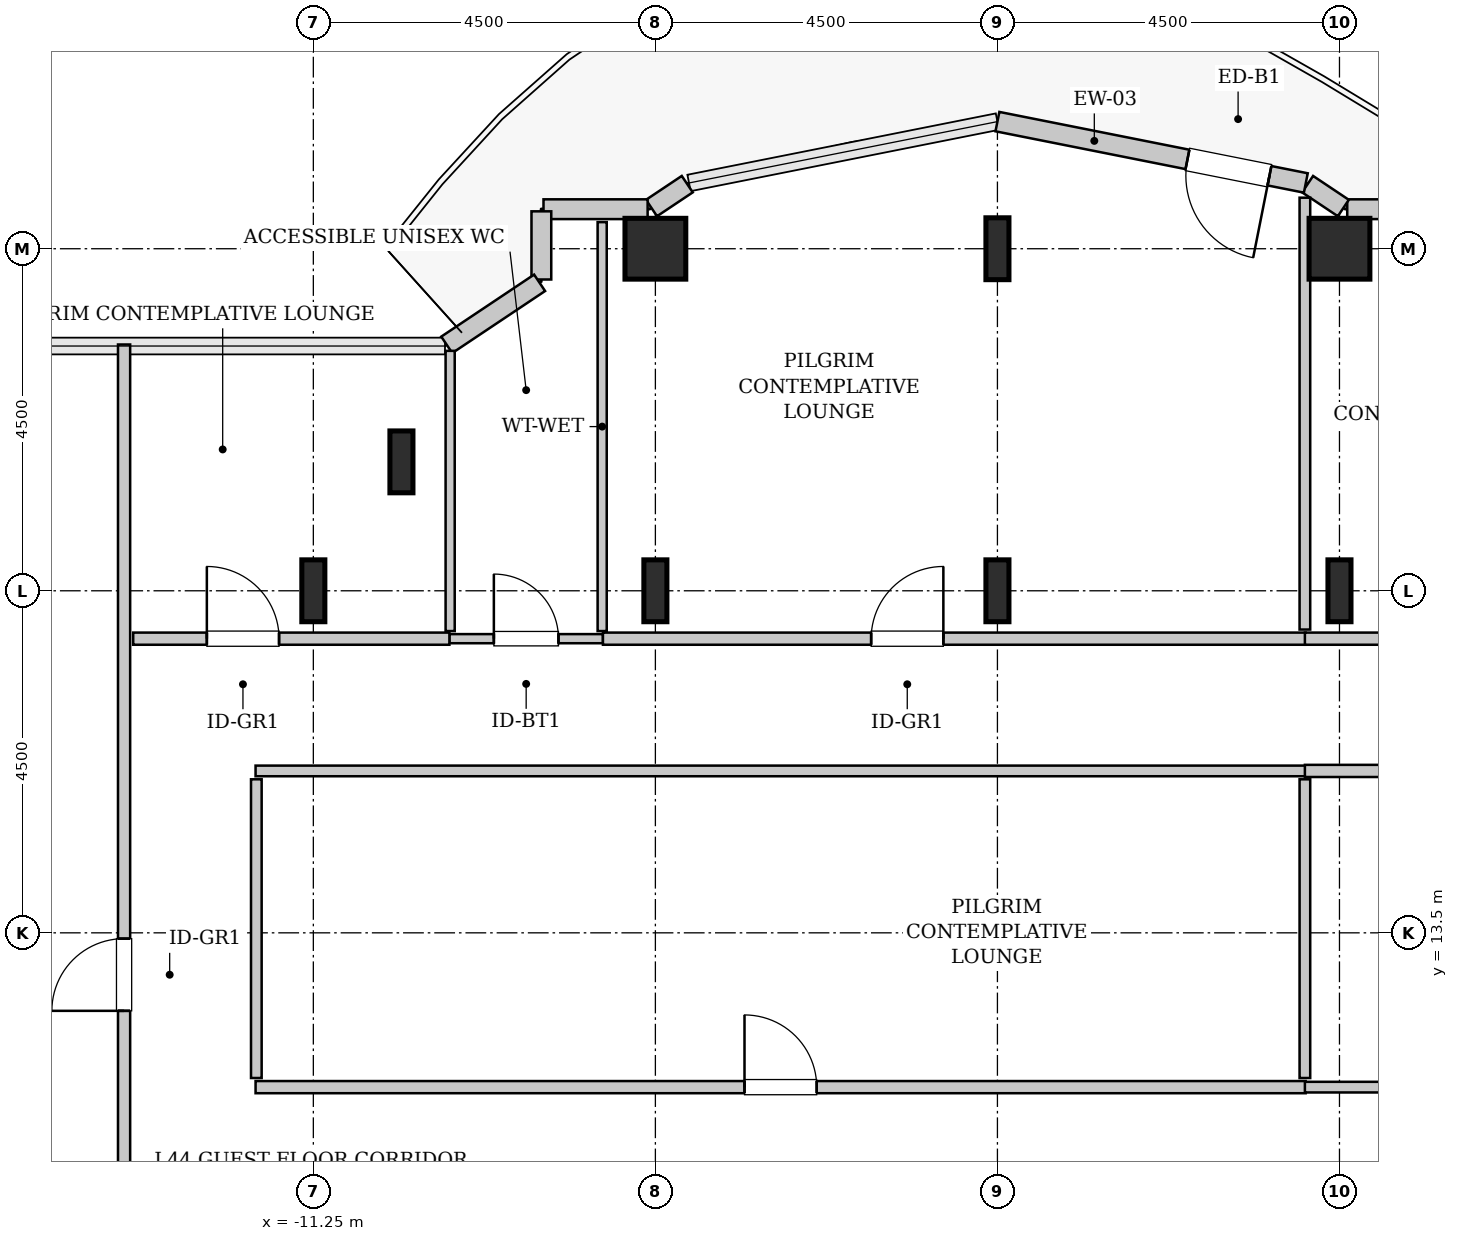
"""IFC4 building model, lengths in metres.
Left out: names, types, materials, properties, quantities, classifications, styles, units other than length and angle.
Written with IfcOpenShell. Run it as: python <this file> out.ifc"""

import sys

from ifc_helpers import new_model, si_unit, direction, frame, frame_2d, origin, origin_2d, place, context, subcontext, project, spatial, rectangle, hollow_rectangle, i_section, extrude, source, transform, mapped, element, fill, save


model = new_model("IFC4")
c1 = context("Model", 3, precision=1e-05, world=origin(), true_north=direction((0.0, 1.0)))
c2 = subcontext(c1, "Body", "Model", "MODEL_VIEW")
j1 = project(units=[si_unit("LENGTHUNIT", "METRE"), si_unit("PLANEANGLEUNIT", "RADIAN")], contexts=[c1])
p1 = place(None, origin())
s1 = spatial("IfcSite", under=j1, at=p1, CompositionType="ELEMENT")
p2 = place(p1, origin())
s2 = spatial("IfcBuilding", under=s1, at=p2, CompositionType="ELEMENT")
p3 = place(p2, frame((0.0, 0.0, 179.2)))
s3 = spatial("IfcBuildingStorey", under=s2, at=p3, CompositionType="ELEMENT", Elevation=179.2)
m1 = source(origin(), c2, "Body", "SweptSolid", [
    extrude(i_section(OverallWidth=0.303, OverallDepth=0.814, WebThickness=0.021, FlangeThickness=0.04, FilletRadius=0.03, at=origin_2d()), origin(), (0.0, 0.0, 1.0), 3.8),
])
for number, where, z_axis, x_axis in (
    (1, (-11.25, 18.0, 0.0), (0.0, 0.0, 1.0), (1.0, 0.0, 0.0)),
    (2, (-10.091, 19.696, 0.0), (0.0, 0.0, 1.0), (1.0, 0.0, 0.0)),
    (3, (-6.75, 18.0, 0.0), (0.0, 0.0, 1.0), (1.0, 0.0, 0.0)),
):
    element("IfcColumn", number, at=place(p3, frame(where, z_axis=z_axis, x_axis=x_axis)), inside=s3, PredefinedType="COLUMN", context=c2, shape_type="MappedRepresentation", body=[
        mapped(m1, transform((0.0, 0.0, 0.0), x_axis=(1.0, 0.0, 0.0), y_axis=(0.0, 1.0, 0.0), z_axis=(0.0, 0.0, 1.0), scale=1.0)),
    ])
m2 = source(origin(), c2, "Body", "SweptSolid", [
    extrude(hollow_rectangle(XDim=0.8, YDim=0.8, WallThickness=0.04, InnerFilletRadius=0.04, OuterFilletRadius=0.08, at=origin_2d()), origin(), (0.0, 0.0, 1.0), 3.8),
])
p4 = place(p3, frame((-6.75, 22.5, 0.0), z_axis=(0.0, 0.0, 1.0), x_axis=(1.0, 0.0, 0.0)))
e4 = element("IfcColumn", 4, at=p4, inside=s3, PredefinedType="COLUMN", context=c2, shape_type="MappedRepresentation", body=[
    mapped(m2, transform((0.0, 0.0, 0.0), x_axis=(1.0, 0.0, 0.0), y_axis=(0.0, 1.0, 0.0), z_axis=(0.0, 0.0, 1.0), scale=1.0)),
])
for number, where, z_axis, x_axis in (
    (5, (-2.25, 18.0, 0.0), (0.0, 0.0, 1.0), (1.0, 0.0, 0.0)),
    (6, (-2.25, 22.5, 0.0), (0.0, 0.0, 1.0), (1.0, 0.0, 0.0)),
    (7, (2.25, 18.0, 0.0), (0.0, 0.0, 1.0), (1.0, 0.0, 0.0)),
):
    element("IfcColumn", number, at=place(p3, frame(where, z_axis=z_axis, x_axis=x_axis)), inside=s3, PredefinedType="COLUMN", context=c2, shape_type="MappedRepresentation", body=[
        mapped(m1, transform((0.0, 0.0, 0.0), x_axis=(1.0, 0.0, 0.0), y_axis=(0.0, 1.0, 0.0), z_axis=(0.0, 0.0, 1.0), scale=1.0)),
    ])
p5 = place(p3, frame((2.25, 22.5, 0.0), z_axis=(0.0, 0.0, 1.0), x_axis=(1.0, 0.0, 0.0)))
e8 = element("IfcColumn", 8, at=p5, inside=s3, PredefinedType="COLUMN", context=c2, shape_type="MappedRepresentation", body=[
    mapped(m2, transform((0.0, 0.0, 0.0), x_axis=(1.0, 0.0, 0.0), y_axis=(0.0, 1.0, 0.0), z_axis=(0.0, 0.0, 1.0), scale=1.0)),
])
m3 = source(origin(), c2, "Body", "SweptSolid", [
    extrude(rectangle(XDim=1.37, YDim=0.26, at=frame_2d((0.685, 0.0))), origin(), (0.0, 0.0, 1.0), 3.55),
])
p6 = place(p3, frame((3.722, 23.02, 0.0), z_axis=(0.0, 0.0, 1.0), x_axis=(-1.0, 0.0, 0.0)))
e9 = element("IfcWall", 9, at=p6, inside=s3, PredefinedType="SOLIDWALL", context=c2, shape_type="MappedRepresentation", body=[
    mapped(m3, transform((0.0, 0.0, 0.0), x_axis=(1.0, 0.0, 0.0), y_axis=(0.0, 1.0, 0.0), z_axis=(0.0, 0.0, 1.0), scale=1.0)),
])
m4 = source(origin(), c2, "Body", "SweptSolid", [
    extrude(rectangle(XDim=0.565, YDim=0.26, at=frame_2d((0.283, 0.0))), origin(), (0.0, 0.0, 1.0), 3.55),
])
p7 = place(p3, frame((2.301, 23.036, 0.0), z_axis=(0.0, 0.0, 1.0), x_axis=(-0.831651492666, 0.555297933317, 0.0)))
e10 = element("IfcWall", 10, at=p7, inside=s3, PredefinedType="SOLIDWALL", context=c2, shape_type="MappedRepresentation", body=[
    mapped(m4, transform((0.0, 0.0, 0.0), x_axis=(1.0, 0.0, 0.0), y_axis=(0.0, 1.0, 0.0), z_axis=(0.0, 0.0, 1.0), scale=1.0)),
])
m5 = source(origin(), c2, "Body", "SweptSolid", [
    extrude(rectangle(XDim=4.137, YDim=0.26, at=frame_2d((2.068, 0.0))), origin(), (0.0, 0.0, 1.0), 3.55),
])
p8 = place(p3, frame((1.807, 23.365, 0.0), z_axis=(0.0, 0.0, 1.0), x_axis=(-0.980782170794, 0.195105954428, 0.0)))
e11 = element("IfcWall", 11, at=p8, inside=s3, PredefinedType="SOLIDWALL", context=c2, shape_type="MappedRepresentation", body=[
    mapped(m5, transform((0.0, 0.0, 0.0), x_axis=(1.0, 0.0, 0.0), y_axis=(0.0, 1.0, 0.0), z_axis=(0.0, 0.0, 1.0), scale=1.0)),
])
p9 = place(p8, frame((0.488, 0.0, 0.0)))
e12 = element("IfcOpeningElement", 12, at=p9, cuts=e11, PredefinedType="OPENING", context=c2, shape_type="SweptSolid", body=[
    extrude(rectangle(XDim=1.1, YDim=2.2, at=frame_2d((0.55, 1.1))), frame((0.0, 0.14, 0.0), z_axis=(0.0, -1.0, 0.0), x_axis=(1.0, 0.0, 0.0)), (0.0, 0.0, 1.0), 0.28),
])
p10 = place(p3, frame((-6.331, 23.35, 0.0), z_axis=(0.0, 0.0, 1.0), x_axis=(-0.831651492666, -0.555297933317, 0.0)))
e13 = element("IfcWall", 13, at=p10, inside=s3, PredefinedType="SOLIDWALL", context=c2, shape_type="MappedRepresentation", body=[
    mapped(m4, transform((0.0, 0.0, 0.0), x_axis=(1.0, 0.0, 0.0), y_axis=(0.0, 1.0, 0.0), z_axis=(0.0, 0.0, 1.0), scale=1.0)),
])
p11 = place(p3, frame((-6.852, 23.02, 0.0), z_axis=(0.0, 0.0, 1.0), x_axis=(-1.0, 0.0, 0.0)))
e14 = element("IfcWall", 14, at=p11, inside=s3, PredefinedType="SOLIDWALL", context=c2, shape_type="MappedRepresentation", body=[
    mapped(m3, transform((0.0, 0.0, 0.0), x_axis=(1.0, 0.0, 0.0), y_axis=(0.0, 1.0, 0.0), z_axis=(0.0, 0.0, 1.0), scale=1.0)),
])
m6 = source(origin(), c2, "Body", "SweptSolid", [
    extrude(rectangle(XDim=0.897, YDim=0.26, at=frame_2d((0.448, 0.0))), origin(), (0.0, 0.0, 1.0), 3.55),
])
p12 = place(p3, frame((-8.25, 22.992, 0.0), z_axis=(0.0, 0.0, 1.0), x_axis=(0.0, -1.0, 0.0)))
e15 = element("IfcWall", 15, at=p12, inside=s3, PredefinedType="SOLIDWALL", context=c2, shape_type="MappedRepresentation", body=[
    mapped(m6, transform((0.0, 0.0, 0.0), x_axis=(1.0, 0.0, 0.0), y_axis=(0.0, 1.0, 0.0), z_axis=(0.0, 0.0, 1.0), scale=1.0)),
])
m7 = source(origin(), c2, "Body", "SweptSolid", [
    extrude(rectangle(XDim=1.469, YDim=0.26, at=frame_2d((0.734, 0.0))), origin(), (0.0, 0.0, 1.0), 3.55),
])
p13 = place(p3, frame((-8.273, 22.052, 0.0), z_axis=(0.0, 0.0, 1.0), x_axis=(-0.831461760506, -0.555581983884, 0.0)))
e16 = element("IfcWall", 16, at=p13, inside=s3, PredefinedType="SOLIDWALL", context=c2, shape_type="MappedRepresentation", body=[
    mapped(m7, transform((0.0, 0.0, 0.0), x_axis=(1.0, 0.0, 0.0), y_axis=(0.0, 1.0, 0.0), z_axis=(0.0, 0.0, 1.0), scale=1.0)),
])
m8 = source(origin(), c2, "Body", "SweptSolid", [
    extrude(rectangle(XDim=2.02, YDim=0.12, at=frame_2d((1.01, 0.0))), origin(), (0.0, 0.0, 1.0), 3.535),
])
p14 = place(p3, frame((-9.46, 17.37, 0.0), z_axis=(0.0, 0.0, 1.0), x_axis=(1.0, 0.0, 0.0)))
e17 = element("IfcWall", 17, at=p14, inside=s3, PredefinedType="PLUMBINGWALL", context=c2, shape_type="MappedRepresentation", body=[
    mapped(m8, transform((0.0, 0.0, 0.0), x_axis=(1.0, 0.0, 0.0), y_axis=(0.0, 1.0, 0.0), z_axis=(0.0, 0.0, 1.0), scale=1.0)),
])
p15 = place(p14, frame((0.585, 0.0, 0.0)))
e18 = element("IfcOpeningElement", 18, at=p15, cuts=e17, PredefinedType="OPENING", context=c2, shape_type="SweptSolid", body=[
    extrude(rectangle(XDim=0.85, YDim=2.1, at=frame_2d((0.425, 1.05))), frame((0.0, 0.07, 0.0), z_axis=(0.0, -1.0, 0.0), x_axis=(1.0, 0.0, 0.0)), (0.0, 0.0, 1.0), 0.14),
])
m9 = source(origin(), c2, "Body", "SweptSolid", [
    extrude(rectangle(XDim=5.38, YDim=0.12, at=frame_2d((2.69, 0.0))), origin(), (0.0, 0.0, 1.0), 3.535),
])
p16 = place(p3, frame((-7.45, 17.47, 0.0), z_axis=(0.0, 0.0, 1.0), x_axis=(0.0, 1.0, 0.0)))
e19 = element("IfcWall", 19, at=p16, inside=s3, PredefinedType="PLUMBINGWALL", context=c2, shape_type="MappedRepresentation", body=[
    mapped(m9, transform((0.0, 0.0, 0.0), x_axis=(1.0, 0.0, 0.0), y_axis=(0.0, 1.0, 0.0), z_axis=(0.0, 0.0, 1.0), scale=1.0)),
])
m10 = source(origin(), c2, "Body", "SweptSolid", [
    extrude(rectangle(XDim=3.687, YDim=0.12, at=frame_2d((1.843, 0.0))), origin(), (0.0, 0.0, 1.0), 3.535),
])
p17 = place(p3, frame((-9.45, 17.47, 0.0), z_axis=(0.0, 0.0, 1.0), x_axis=(0.0, 1.0, 0.0)))
e20 = element("IfcWall", 20, at=p17, inside=s3, PredefinedType="PLUMBINGWALL", context=c2, shape_type="MappedRepresentation", body=[
    mapped(m10, transform((0.0, 0.0, 0.0), x_axis=(1.0, 0.0, 0.0), y_axis=(0.0, 1.0, 0.0), z_axis=(0.0, 0.0, 1.0), scale=1.0)),
])
m11 = source(origin(), c2, "Body", "SweptSolid", [
    extrude(rectangle(XDim=12.752, YDim=0.16, at=frame_2d((6.376, 0.0))), origin(), (0.0, 0.0, 1.0), 3.535),
])
p18 = place(p3, frame((-13.74, 8.488, 0.0), z_axis=(0.0, 0.0, 1.0), x_axis=(0.0, 1.0, 0.0)))
e21 = element("IfcWall", 21, at=p18, inside=s3, PredefinedType="PARTITIONING", context=c2, shape_type="MappedRepresentation", body=[
    mapped(m11, transform((0.0, 0.0, 0.0), x_axis=(1.0, 0.0, 0.0), y_axis=(0.0, 1.0, 0.0), z_axis=(0.0, 0.0, 1.0), scale=1.0)),
])
p19 = place(p18, frame((3.986, 0.0, 0.0)))
e22 = element("IfcOpeningElement", 22, at=p19, cuts=e21, PredefinedType="OPENING", context=c2, shape_type="SweptSolid", body=[
    extrude(rectangle(XDim=0.95, YDim=2.1, at=frame_2d((0.475, 1.05))), frame((0.0, 0.09, 0.0), z_axis=(0.0, -1.0, 0.0), x_axis=(1.0, 0.0, 0.0)), (0.0, 0.0, 1.0), 0.18),
])
m12 = source(origin(), c2, "Body", "SweptSolid", [
    extrude(rectangle(XDim=13.815, YDim=0.16, at=frame_2d((6.907, 0.0))), origin(), (0.0, 0.0, 1.0), 3.535),
])
p20 = place(p3, frame((-12.01, 11.47, 0.0), z_axis=(0.0, 0.0, 1.0), x_axis=(1.0, 0.0, 0.0)))
e23 = element("IfcWall", 23, at=p20, inside=s3, PredefinedType="PARTITIONING", context=c2, shape_type="MappedRepresentation", body=[
    mapped(m12, transform((0.0, 0.0, 0.0), x_axis=(1.0, 0.0, 0.0), y_axis=(0.0, 1.0, 0.0), z_axis=(0.0, 0.0, 1.0), scale=1.0)),
])
p21 = place(p20, frame((6.433, 0.0, 0.0)))
e24 = element("IfcOpeningElement", 24, at=p21, cuts=e23, PredefinedType="OPENING", context=c2, shape_type="SweptSolid", body=[
    extrude(rectangle(XDim=0.95, YDim=2.1, at=frame_2d((0.475, 1.05))), frame((0.0, 0.09, 0.0), z_axis=(0.0, -1.0, 0.0), x_axis=(1.0, 0.0, 0.0)), (0.0, 0.0, 1.0), 0.18),
])
m13 = source(origin(), c2, "Body", "SweptSolid", [
    extrude(rectangle(XDim=13.815, YDim=0.14, at=frame_2d((6.907, 0.0))), origin(), (0.0, 0.0, 1.0), 3.535),
])
p22 = place(p3, frame((-12.01, 15.63, 0.0), z_axis=(0.0, 0.0, 1.0), x_axis=(1.0, 0.0, 0.0)))
e25 = element("IfcWall", 25, at=p22, inside=s3, PredefinedType="PARTITIONING", context=c2, shape_type="MappedRepresentation", body=[
    mapped(m13, transform((0.0, 0.0, 0.0), x_axis=(1.0, 0.0, 0.0), y_axis=(0.0, 1.0, 0.0), z_axis=(0.0, 0.0, 1.0), scale=1.0)),
])
m14 = source(origin(), c2, "Body", "SweptSolid", [
    extrude(rectangle(XDim=3.93, YDim=0.14, at=frame_2d((1.965, 0.0))), origin(), (0.0, 0.0, 1.0), 3.535),
])
for number, where, z_axis, x_axis in (
    (26, (-12.0, 11.59, 0.0), (0.0, 0.0, 1.0), (0.0, 1.0, 0.0)),
    (27, (1.795, 11.59, 0.0), (0.0, 0.0, 1.0), (0.0, 1.0, 0.0)),
):
    element("IfcWall", number, at=place(p3, frame(where, z_axis=z_axis, x_axis=x_axis)), inside=s3, PredefinedType="PARTITIONING", context=c2, shape_type="MappedRepresentation", body=[
        mapped(m14, transform((0.0, 0.0, 0.0), x_axis=(1.0, 0.0, 0.0), y_axis=(0.0, 1.0, 0.0), z_axis=(0.0, 0.0, 1.0), scale=1.0)),
    ])
m15 = source(origin(), c2, "Body", "SweptSolid", [
    extrude(rectangle(XDim=9.245, YDim=0.16, at=frame_2d((4.623, 0.0))), origin(), (0.0, 0.0, 1.0), 3.535),
])
p23 = place(p3, frame((-7.44, 17.37, 0.0), z_axis=(0.0, 0.0, 1.0), x_axis=(1.0, 0.0, 0.0)))
e28 = element("IfcWall", 28, at=p23, inside=s3, PredefinedType="PARTITIONING", context=c2, shape_type="MappedRepresentation", body=[
    mapped(m15, transform((0.0, 0.0, 0.0), x_axis=(1.0, 0.0, 0.0), y_axis=(0.0, 1.0, 0.0), z_axis=(0.0, 0.0, 1.0), scale=1.0)),
])
p24 = place(p23, frame((3.529, 0.0, 0.0)))
e29 = element("IfcOpeningElement", 29, at=p24, cuts=e28, PredefinedType="OPENING", context=c2, shape_type="SweptSolid", body=[
    extrude(rectangle(XDim=0.95, YDim=2.1, at=frame_2d((0.475, 1.05))), frame((0.0, 0.09, 0.0), z_axis=(0.0, -1.0, 0.0), x_axis=(1.0, 0.0, 0.0)), (0.0, 0.0, 1.0), 0.18),
])
m16 = source(origin(), c2, "Body", "SweptSolid", [
    extrude(rectangle(XDim=5.681, YDim=0.14, at=frame_2d((2.841, 0.0))), origin(), (0.0, 0.0, 1.0), 2.875),
])
p25 = place(p3, frame((1.795, 17.49, 0.0), z_axis=(0.0, 0.0, 1.0), x_axis=(0.0, 1.0, 0.0)))
e30 = element("IfcWall", 30, at=p25, inside=s3, PredefinedType="PARTITIONING", context=c2, shape_type="MappedRepresentation", body=[
    mapped(m16, transform((0.0, 0.0, 0.0), x_axis=(1.0, 0.0, 0.0), y_axis=(0.0, 1.0, 0.0), z_axis=(0.0, 0.0, 1.0), scale=1.0)),
])
m17 = source(origin(), c2, "Body", "SweptSolid", [
    extrude(rectangle(XDim=4.16, YDim=0.16, at=frame_2d((2.08, 0.0))), origin(), (0.0, 0.0, 1.0), 3.535),
])
p26 = place(p3, frame((-13.62, 17.37, 0.0), z_axis=(0.0, 0.0, 1.0), x_axis=(1.0, 0.0, 0.0)))
e31 = element("IfcWall", 31, at=p26, inside=s3, PredefinedType="PARTITIONING", context=c2, shape_type="MappedRepresentation", body=[
    mapped(m17, transform((0.0, 0.0, 0.0), x_axis=(1.0, 0.0, 0.0), y_axis=(0.0, 1.0, 0.0), z_axis=(0.0, 0.0, 1.0), scale=1.0)),
])
p27 = place(p26, frame((0.969, 0.0, 0.0)))
e32 = element("IfcOpeningElement", 32, at=p27, cuts=e31, PredefinedType="OPENING", context=c2, shape_type="SweptSolid", body=[
    extrude(rectangle(XDim=0.95, YDim=2.1, at=frame_2d((0.475, 1.05))), frame((0.0, 0.09, 0.0), z_axis=(0.0, -1.0, 0.0), x_axis=(1.0, 0.0, 0.0)), (0.0, 0.0, 1.0), 0.18),
])
m18 = source(origin(), c2, "Body", "SweptSolid", [
    extrude(rectangle(XDim=6.01, YDim=0.16, at=frame_2d((3.005, 0.0))), origin(), (0.0, 0.0, 1.0), 3.535),
])
p28 = place(p3, frame((1.795, 17.37, 0.0), z_axis=(0.0, 0.0, 1.0), x_axis=(1.0, 0.0, 0.0)))
e33 = element("IfcWall", 33, at=p28, inside=s3, PredefinedType="PARTITIONING", context=c2, shape_type="MappedRepresentation", body=[
    mapped(m18, transform((0.0, 0.0, 0.0), x_axis=(1.0, 0.0, 0.0), y_axis=(0.0, 1.0, 0.0), z_axis=(0.0, 0.0, 1.0), scale=1.0)),
])
p29 = place(p28, frame((2.53, 0.0, 0.0)))
e34 = element("IfcOpeningElement", 34, at=p29, cuts=e33, PredefinedType="OPENING", context=c2, shape_type="SweptSolid", body=[
    extrude(rectangle(XDim=0.95, YDim=2.1, at=frame_2d((0.475, 1.05))), frame((0.0, 0.09, 0.0), z_axis=(0.0, -1.0, 0.0), x_axis=(1.0, 0.0, 0.0)), (0.0, 0.0, 1.0), 0.18),
])
p30 = place(p3, frame((1.795, 15.63, 0.0), z_axis=(0.0, 0.0, 1.0), x_axis=(1.0, 0.0, 0.0)))
e35 = element("IfcWall", 35, at=p30, inside=s3, PredefinedType="PARTITIONING", context=c2, shape_type="MappedRepresentation", body=[
    mapped(m18, transform((0.0, 0.0, 0.0), x_axis=(1.0, 0.0, 0.0), y_axis=(0.0, 1.0, 0.0), z_axis=(0.0, 0.0, 1.0), scale=1.0)),
])
p31 = place(p30, frame((2.53, 0.0, 0.0)))
e36 = element("IfcOpeningElement", 36, at=p31, cuts=e35, PredefinedType="OPENING", context=c2, shape_type="SweptSolid", body=[
    extrude(rectangle(XDim=0.95, YDim=2.1, at=frame_2d((0.475, 1.05))), frame((0.0, 0.09, 0.0), z_axis=(0.0, -1.0, 0.0), x_axis=(1.0, 0.0, 0.0)), (0.0, 0.0, 1.0), 0.18),
])
m19 = source(origin(), c2, "Body", "SweptSolid", [
    extrude(rectangle(XDim=6.01, YDim=0.14, at=frame_2d((3.005, 0.0))), origin(), (0.0, 0.0, 1.0), 3.535),
])
p32 = place(p3, frame((1.795, 11.47, 0.0), z_axis=(0.0, 0.0, 1.0), x_axis=(1.0, 0.0, 0.0)))
e37 = element("IfcWall", 37, at=p32, inside=s3, PredefinedType="PARTITIONING", context=c2, shape_type="MappedRepresentation", body=[
    mapped(m19, transform((0.0, 0.0, 0.0), x_axis=(1.0, 0.0, 0.0), y_axis=(0.0, 1.0, 0.0), z_axis=(0.0, 0.0, 1.0), scale=1.0)),
])
m20 = source(origin(), c2, "Body", "SweptSolid", [
    extrude(rectangle(XDim=1.1, YDim=2.2, at=frame_2d((0.55, 1.1))), frame((0.0, 0.025, 0.0), z_axis=(0.0, -1.0, 0.0), x_axis=(1.0, 0.0, 0.0)), (0.0, 0.0, 1.0), 0.05),
])
p33 = place(p9, origin())
e38 = element("IfcDoor", 38, at=p33, inside=s3, OperationType="SINGLE_SWING_LEFT", PredefinedType="DOOR", context=c2, shape_type="MappedRepresentation", body=[
    mapped(m20, transform((0.0, 0.0, 0.0), x_axis=(1.0, 0.0, 0.0), y_axis=(0.0, 1.0, 0.0), z_axis=(0.0, 0.0, 1.0), scale=1.0)),
])
fill(e12, e38)
m21 = source(origin(), c2, "Body", "SweptSolid", [
    extrude(rectangle(XDim=0.85, YDim=2.1, at=frame_2d((0.425, 1.05))), frame((0.0, 0.025, 0.0), z_axis=(0.0, -1.0, 0.0), x_axis=(1.0, 0.0, 0.0)), (0.0, 0.0, 1.0), 0.05),
])
p34 = place(p15, origin())
e39 = element("IfcDoor", 39, at=p34, inside=s3, OperationType="SINGLE_SWING_LEFT", PredefinedType="DOOR", context=c2, shape_type="MappedRepresentation", body=[
    mapped(m21, transform((0.0, 0.0, 0.0), x_axis=(1.0, 0.0, 0.0), y_axis=(0.0, 1.0, 0.0), z_axis=(0.0, 0.0, 1.0), scale=1.0)),
])
fill(e18, e39)
m22 = source(origin(), c2, "Body", "SweptSolid", [
    extrude(rectangle(XDim=0.95, YDim=2.1, at=frame_2d((0.475, 1.05))), frame((0.0, 0.025, 0.0), z_axis=(0.0, -1.0, 0.0), x_axis=(1.0, 0.0, 0.0)), (0.0, 0.0, 1.0), 0.05),
])
p35 = place(p19, origin())
e40 = element("IfcDoor", 40, at=p35, inside=s3, OperationType="SINGLE_SWING_LEFT", PredefinedType="DOOR", context=c2, shape_type="MappedRepresentation", body=[
    mapped(m22, transform((0.0, 0.0, 0.0), x_axis=(1.0, 0.0, 0.0), y_axis=(0.0, 1.0, 0.0), z_axis=(0.0, 0.0, 1.0), scale=1.0)),
])
fill(e22, e40)
p36 = place(p21, origin())
e41 = element("IfcDoor", 41, at=p36, inside=s3, OperationType="SINGLE_SWING_LEFT", PredefinedType="DOOR", context=c2, shape_type="MappedRepresentation", body=[
    mapped(m22, transform((0.0, 0.0, 0.0), x_axis=(1.0, 0.0, 0.0), y_axis=(0.0, 1.0, 0.0), z_axis=(0.0, 0.0, 1.0), scale=1.0)),
])
fill(e24, e41)
p37 = place(p24, origin())
e42 = element("IfcDoor", 42, at=p37, inside=s3, OperationType="SINGLE_SWING_RIGHT", PredefinedType="DOOR", context=c2, shape_type="MappedRepresentation", body=[
    mapped(m22, transform((0.0, 0.0, 0.0), x_axis=(1.0, 0.0, 0.0), y_axis=(0.0, 1.0, 0.0), z_axis=(0.0, 0.0, 1.0), scale=1.0)),
])
fill(e29, e42)
p38 = place(p27, origin())
e43 = element("IfcDoor", 43, at=p38, inside=s3, OperationType="SINGLE_SWING_LEFT", PredefinedType="DOOR", context=c2, shape_type="MappedRepresentation", body=[
    mapped(m22, transform((0.0, 0.0, 0.0), x_axis=(1.0, 0.0, 0.0), y_axis=(0.0, 1.0, 0.0), z_axis=(0.0, 0.0, 1.0), scale=1.0)),
])
fill(e32, e43)
save(model, sys.argv[1])
